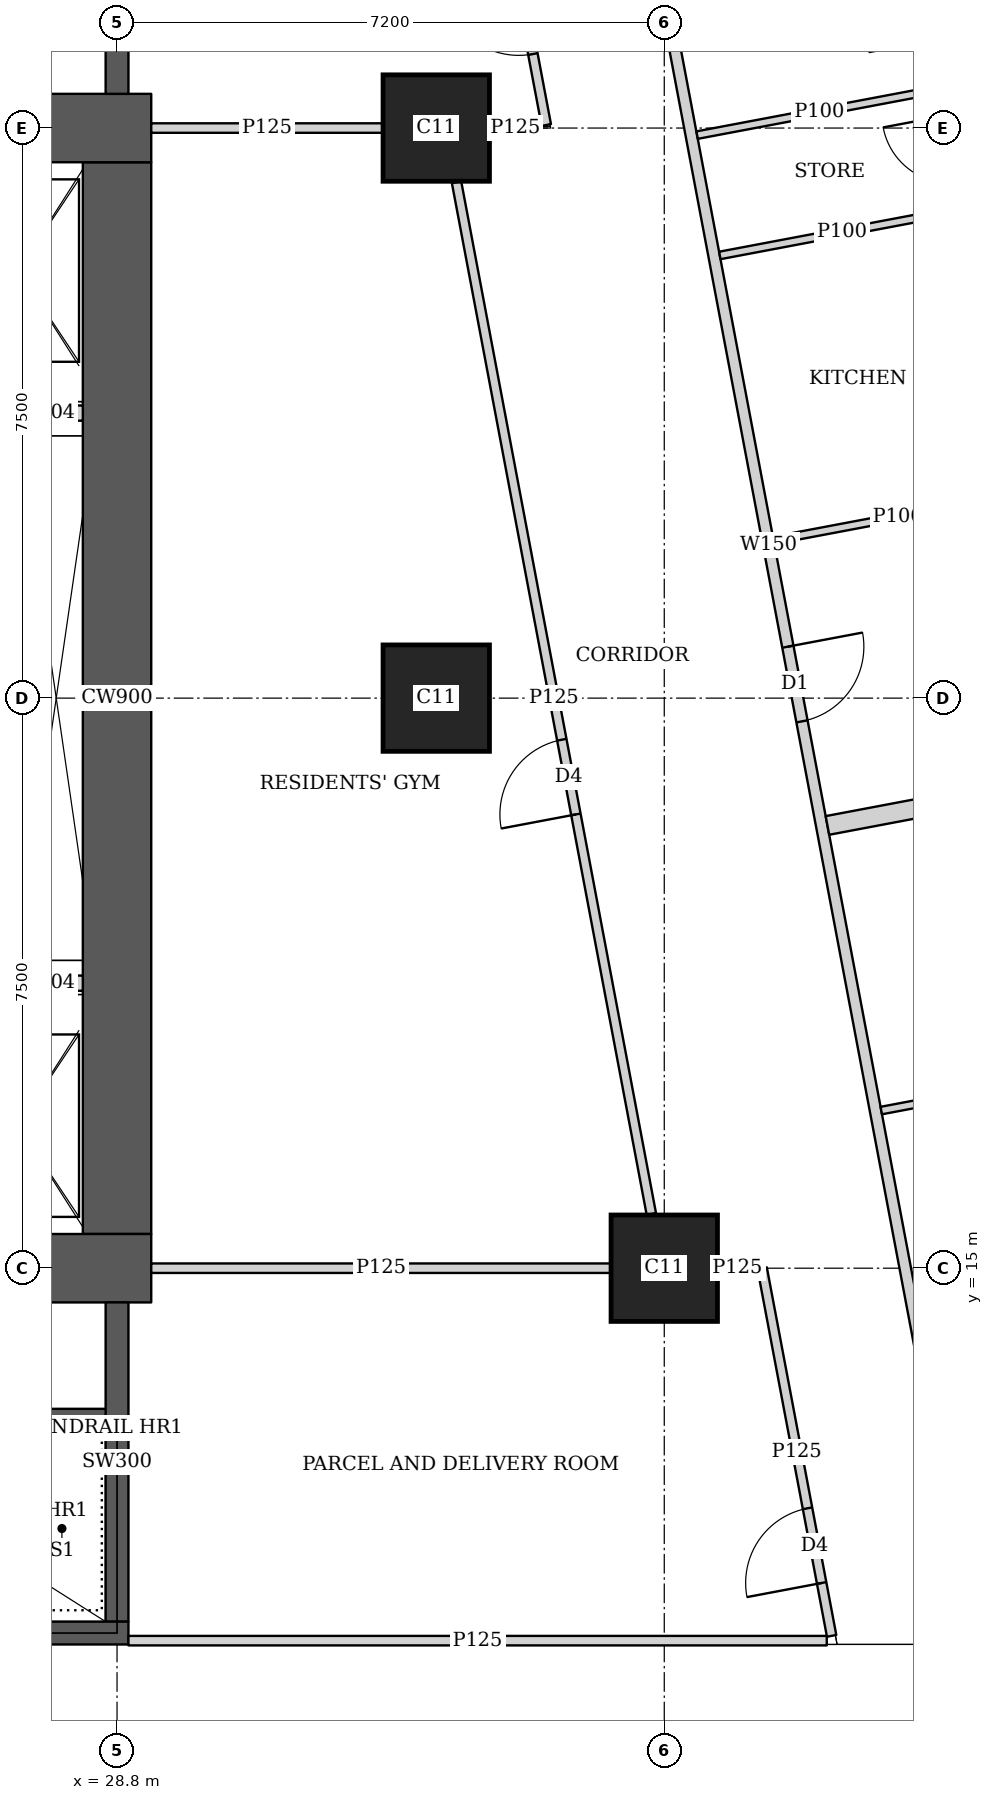
"""IFC4 building model, lengths in metres.
Left out: names, types, materials, properties, quantities, classifications, styles, units other than length and angle.
Written with IfcOpenShell. Run it as: python <this file> out.ifc"""

import sys

from ifc_helpers import new_model, si_unit, direction, frame, frame_2d, origin, origin_2d, place, context, subcontext, project, spatial, rectangle, extrude, element, fill, save


model = new_model("IFC4")
c1 = context("Model", 3, precision=1e-05, world=origin(), true_north=direction((0.0, 1.0)))
c2 = subcontext(c1, "Body", "Model", "MODEL_VIEW")
j1 = project(units=[si_unit("LENGTHUNIT", "METRE"), si_unit("PLANEANGLEUNIT", "RADIAN")], contexts=[c1])
p1 = place(None, origin())
s1 = spatial("IfcSite", under=j1, at=p1, CompositionType="ELEMENT")
p2 = place(p1, origin())
s2 = spatial("IfcBuilding", under=s1, at=p2, CompositionType="ELEMENT")
p3 = place(p2, frame((0.0, 0.0, 285.35)))
s3 = spatial("IfcBuildingStorey", under=s2, at=p3, CompositionType="ELEMENT", Elevation=285.35)
for number, where, z_axis, x_axis in (
    (1, (36.0, 15.0, 0.0), (0.0, 0.0, 1.0), (1.0, 0.0, 0.0)),
    (2, (33.0, 22.5, 0.0), (0.0, 0.0, 1.0), (1.0, 0.0, 0.0)),
    (3, (33.0, 30.0, 0.0), (0.0, 0.0, 1.0), (1.0, 0.0, 0.0)),
):
    element("IfcColumn", number, at=place(p3, frame(where, z_axis=z_axis, x_axis=x_axis)), inside=s3, PredefinedType="COLUMN", context=c2, shape_type="SweptSolid", body=[
        extrude(rectangle(XDim=1.4, YDim=1.4, at=origin_2d()), origin(), (0.0, 0.0, 1.0), 3.75),
    ])
p4 = place(p3, frame((13.95, 15.0, 0.0), z_axis=(0.0, 0.0, 1.0), x_axis=(1.0, 0.0, 0.0)))
e4 = element("IfcWall", 4, at=p4, inside=s3, PredefinedType="SHEAR", context=c2, shape_type="SweptSolid", body=[
    extrude(rectangle(XDim=15.3, YDim=0.9, at=frame_2d((7.65, 0.0))), origin(), (0.0, 0.0, 1.0), 3.75),
])
p5 = place(p4, frame((4.45, 0.0, 0.0)))
e5 = element("IfcOpeningElement", 5, at=p5, cuts=e4, PredefinedType="OPENING", context=c2, shape_type="SweptSolid", body=[
    extrude(rectangle(XDim=1.8, YDim=2.1, at=frame_2d((0.9, 1.05))), frame((0.0, 0.46, 0.0), z_axis=(0.0, -1.0, 0.0), x_axis=(1.0, 0.0, 0.0)), (0.0, 0.0, 1.0), 0.92),
])
p6 = place(p4, frame((10.7, 0.0, 0.0)))
e6 = element("IfcOpeningElement", 6, at=p6, cuts=e4, PredefinedType="OPENING", context=c2, shape_type="SweptSolid", body=[
    extrude(rectangle(XDim=1.1, YDim=2.1, at=frame_2d((0.55, 1.05))), frame((0.0, 0.46, 0.0), z_axis=(0.0, -1.0, 0.0), x_axis=(1.0, 0.0, 0.0)), (0.0, 0.0, 1.0), 0.92),
])
p7 = place(p3, frame((13.95, 30.0, 0.0), z_axis=(0.0, 0.0, 1.0), x_axis=(1.0, 0.0, 0.0)))
e7 = element("IfcWall", 7, at=p7, inside=s3, PredefinedType="SHEAR", context=c2, shape_type="SweptSolid", body=[
    extrude(rectangle(XDim=15.3, YDim=0.9, at=frame_2d((7.65, 0.0))), origin(), (0.0, 0.0, 1.0), 3.75),
])
p8 = place(p7, frame((4.45, 0.0, 0.0)))
e8 = element("IfcOpeningElement", 8, at=p8, cuts=e7, PredefinedType="OPENING", context=c2, shape_type="SweptSolid", body=[
    extrude(rectangle(XDim=1.8, YDim=2.1, at=frame_2d((0.9, 1.05))), frame((0.0, 0.46, 0.0), z_axis=(0.0, -1.0, 0.0), x_axis=(1.0, 0.0, 0.0)), (0.0, 0.0, 1.0), 0.92),
])
p9 = place(p7, frame((10.7, 0.0, 0.0)))
e9 = element("IfcOpeningElement", 9, at=p9, cuts=e7, PredefinedType="OPENING", context=c2, shape_type="SweptSolid", body=[
    extrude(rectangle(XDim=1.1, YDim=2.1, at=frame_2d((0.55, 1.05))), frame((0.0, 0.46, 0.0), z_axis=(0.0, -1.0, 0.0), x_axis=(1.0, 0.0, 0.0)), (0.0, 0.0, 1.0), 0.92),
])
p10 = place(p3, frame((28.8, 15.45, 0.0), z_axis=(0.0, 0.0, 1.0), x_axis=(0.0, 1.0, 0.0)))
e10 = element("IfcWall", 10, at=p10, inside=s3, PredefinedType="SHEAR", context=c2, shape_type="SweptSolid", body=[
    extrude(rectangle(XDim=14.1, YDim=0.9, at=frame_2d((7.05, 0.0))), origin(), (0.0, 0.0, 1.0), 3.75),
])
p11 = place(p3, frame((21.45, 10.2, 0.0), z_axis=(0.0, 0.0, 1.0), x_axis=(1.0, 0.0, 0.0)))
e11 = element("IfcWall", 11, at=p11, inside=s3, PredefinedType="SHEAR", context=c2, shape_type="SweptSolid", body=[
    extrude(rectangle(XDim=7.5, YDim=0.3, at=frame_2d((3.75, 0.0))), origin(), (0.0, 0.0, 1.0), 3.75),
])
p12 = place(p11, frame((1.2, 0.0, 0.0)))
e12 = element("IfcOpeningElement", 12, at=p12, cuts=e11, PredefinedType="OPENING", context=c2, shape_type="SweptSolid", body=[
    extrude(rectangle(XDim=1.1, YDim=2.1, at=frame_2d((0.55, 1.05))), frame((0.0, 0.16, 0.0), z_axis=(0.0, -1.0, 0.0), x_axis=(1.0, 0.0, 0.0)), (0.0, 0.0, 1.0), 0.32),
])
for number, where, z_axis, x_axis in (
    (13, (28.8, 10.35, 0.0), (0.0, 0.0, 1.0), (0.0, 1.0, 0.0)),
    (14, (28.8, 30.45, 0.0), (0.0, 0.0, 1.0), (0.0, 1.0, 0.0)),
):
    element("IfcWall", number, at=place(p3, frame(where, z_axis=z_axis, x_axis=x_axis)), inside=s3, PredefinedType="SHEAR", context=c2, shape_type="SweptSolid", body=[
        extrude(rectangle(XDim=4.2, YDim=0.3, at=frame_2d((2.1, 0.0))), origin(), (0.0, 0.0, 1.0), 3.75),
    ])
p13 = place(p3, frame((34.036, 42.186, 0.0), z_axis=(0.0, 0.0, 1.0), x_axis=(0.185593518645, -0.9826266055, 0.0)))
e15 = element("IfcWall", 15, at=p13, inside=s3, PredefinedType="SOLIDWALL", context=c2, shape_type="SweptSolid", body=[
    extrude(rectangle(XDim=35.961, YDim=0.15, at=frame_2d((17.98, 0.0))), origin(), (0.0, 0.0, 1.0), 2.5),
])
p14 = place(p13, frame((19.345, 0.0, 0.0)))
e16 = element("IfcOpeningElement", 16, at=p14, cuts=e15, PredefinedType="OPENING", context=c2, shape_type="SweptSolid", body=[
    extrude(rectangle(XDim=1.0, YDim=2.1, at=frame_2d((0.5, 1.05))), frame((0.0, 0.085, 0.0), z_axis=(0.0, -1.0, 0.0), x_axis=(1.0, 0.0, 0.0)), (0.0, 0.0, 1.0), 0.17),
])
p15 = place(p13, frame((33.774, 0.0, 0.0)))
e17 = element("IfcOpeningElement", 17, at=p15, cuts=e15, PredefinedType="OPENING", context=c2, shape_type="SweptSolid", body=[
    extrude(rectangle(XDim=1.0, YDim=2.1, at=frame_2d((0.5, 1.05))), frame((0.0, 0.085, 0.0), z_axis=(0.0, -1.0, 0.0), x_axis=(1.0, 0.0, 0.0)), (0.0, 0.0, 1.0), 0.17),
])
p16 = place(p3, frame((39.948, 28.932, 0.0), z_axis=(0.0, 0.0, 1.0), x_axis=(-0.982610347627, -0.185679575441, 0.0)))
e18 = element("IfcWall", 18, at=p16, inside=s3, PredefinedType="PARTITIONING", context=c2, shape_type="SweptSolid", body=[
    extrude(rectangle(XDim=3.274, YDim=0.1, at=frame_2d((1.637, 0.0))), origin(), (0.0, 0.0, 1.0), 3.5),
])
p17 = place(p3, frame((40.706, 25.192, 0.0), z_axis=(0.0, 0.0, 1.0), x_axis=(-0.982633623707, -0.185556356831, 0.0)))
e19 = element("IfcWall", 19, at=p17, inside=s3, PredefinedType="PARTITIONING", context=c2, shape_type="SweptSolid", body=[
    extrude(rectangle(XDim=3.325, YDim=0.1, at=frame_2d((1.663, 0.0))), origin(), (0.0, 0.0, 1.0), 3.5),
])
p18 = place(p3, frame((39.649, 30.515, 0.0), z_axis=(0.0, 0.0, 1.0), x_axis=(-0.982610347627, -0.185679575441, 0.0)))
e20 = element("IfcWall", 20, at=p18, inside=s3, PredefinedType="PARTITIONING", context=c2, shape_type="SweptSolid", body=[
    extrude(rectangle(XDim=3.274, YDim=0.1, at=frame_2d((1.637, 0.0))), origin(), (0.0, 0.0, 1.0), 2.5),
])
p19 = place(p3, frame((37.591, 41.685, 0.0), z_axis=(0.0, 0.0, 1.0), x_axis=(0.185541820726, -0.982636368532, 0.0)))
e21 = element("IfcWall", 21, at=p19, inside=s3, PredefinedType="PARTITIONING", context=c2, shape_type="SweptSolid", body=[
    extrude(rectangle(XDim=16.735, YDim=0.1, at=frame_2d((8.367, 0.0))), origin(), (0.0, 0.0, 1.0), 2.5),
])
p20 = place(p19, frame((2.413, 0.0, 0.0)))
e22 = element("IfcOpeningElement", 22, at=p20, cuts=e21, PredefinedType="OPENING", context=c2, shape_type="SweptSolid", body=[
    extrude(rectangle(XDim=0.9, YDim=2.1, at=frame_2d((0.45, 1.05))), frame((0.0, 0.06, 0.0), z_axis=(0.0, -1.0, 0.0), x_axis=(1.0, 0.0, 0.0)), (0.0, 0.0, 1.0), 0.12),
])
p21 = place(p19, frame((6.713, 0.0, 0.0)))
e23 = element("IfcOpeningElement", 23, at=p21, cuts=e21, PredefinedType="OPENING", context=c2, shape_type="SweptSolid", body=[
    extrude(rectangle(XDim=0.9, YDim=2.1, at=frame_2d((0.45, 1.05))), frame((0.0, 0.06, 0.0), z_axis=(0.0, -1.0, 0.0), x_axis=(1.0, 0.0, 0.0)), (0.0, 0.0, 1.0), 0.12),
])
p22 = place(p19, frame((9.805, 0.0, 0.0)))
e24 = element("IfcOpeningElement", 24, at=p22, cuts=e21, PredefinedType="OPENING", context=c2, shape_type="SweptSolid", body=[
    extrude(rectangle(XDim=0.9, YDim=2.1, at=frame_2d((0.45, 1.05))), frame((0.0, 0.06, 0.0), z_axis=(0.0, -1.0, 0.0), x_axis=(1.0, 0.0, 0.0)), (0.0, 0.0, 1.0), 0.12),
])
p23 = place(p19, frame((11.713, 0.0, 0.0)))
e25 = element("IfcOpeningElement", 25, at=p23, cuts=e21, PredefinedType="OPENING", context=c2, shape_type="SweptSolid", body=[
    extrude(rectangle(XDim=0.9, YDim=2.1, at=frame_2d((0.45, 1.05))), frame((0.0, 0.06, 0.0), z_axis=(0.0, -1.0, 0.0), x_axis=(1.0, 0.0, 0.0)), (0.0, 0.0, 1.0), 0.12),
])
p24 = place(p19, frame((14.426, 0.0, 0.0)))
e26 = element("IfcOpeningElement", 26, at=p24, cuts=e21, PredefinedType="OPENING", context=c2, shape_type="SweptSolid", body=[
    extrude(rectangle(XDim=0.9, YDim=2.1, at=frame_2d((0.45, 1.05))), frame((0.0, 0.06, 0.0), z_axis=(0.0, -1.0, 0.0), x_axis=(1.0, 0.0, 0.0)), (0.0, 0.0, 1.0), 0.12),
])
p25 = place(p3, frame((42.593, 21.665, 0.0), z_axis=(0.0, 0.0, 1.0), x_axis=(-0.982612837616, -0.185666398014, 0.0)))
e27 = element("IfcWall", 27, at=p25, inside=s3, PredefinedType="SOLIDWALL", context=c2, shape_type="SweptSolid", body=[
    extrude(rectangle(XDim=4.525, YDim=0.25, at=frame_2d((2.262, 0.0))), origin(), (0.0, 0.0, 1.0), 2.5),
])
p26 = place(p3, frame((42.073, 17.682, 0.0), z_axis=(0.0, 0.0, 1.0), x_axis=(-0.982620626894, -0.185625169636, 0.0)))
e28 = element("IfcWall", 28, at=p26, inside=s3, PredefinedType="PARTITIONING", context=c2, shape_type="SweptSolid", body=[
    extrude(rectangle(XDim=3.275, YDim=0.1, at=frame_2d((1.637, 0.0))), origin(), (0.0, 0.0, 1.0), 3.5),
])
p27 = place(p3, frame((28.95, 10.1, 0.0), z_axis=(0.0, 0.0, 1.0), x_axis=(1.0, 0.0, 0.0)))
e29 = element("IfcWall", 29, at=p27, inside=s3, PredefinedType="PARTITIONING", context=c2, shape_type="SweptSolid", body=[
    extrude(rectangle(XDim=9.188, YDim=0.125, at=frame_2d((4.594, 0.0))), origin(), (0.0, 0.0, 1.0), 3.5),
])
p28 = place(p3, frame((38.202, 10.163, 0.0), z_axis=(0.0, 0.0, 1.0), x_axis=(-0.185641892853, 0.982617467593, 0.0)))
e30 = element("IfcWall", 30, at=p28, inside=s3, PredefinedType="PARTITIONING", context=c2, shape_type="SweptSolid", body=[
    extrude(rectangle(XDim=4.922, YDim=0.125, at=frame_2d((2.461, 0.0))), origin(), (0.0, 0.0, 1.0), 3.5),
])
p29 = place(p28, frame((0.708, 0.0, 0.0)))
e31 = element("IfcOpeningElement", 31, at=p29, cuts=e30, PredefinedType="OPENING", context=c2, shape_type="SweptSolid", body=[
    extrude(rectangle(XDim=1.0, YDim=2.1, at=frame_2d((0.5, 1.05))), frame((0.0, 0.073, 0.0), z_axis=(0.0, -1.0, 0.0), x_axis=(1.0, 0.0, 0.0)), (0.0, 0.0, 1.0), 0.145),
])
p30 = place(p3, frame((34.448, 30.04, 0.0), z_axis=(0.0, 0.0, 1.0), x_axis=(-0.185749459238, 0.982597139418, 0.0)))
e32 = element("IfcWall", 32, at=p30, inside=s3, PredefinedType="PARTITIONING", context=c2, shape_type="SweptSolid", body=[
    extrude(rectangle(XDim=4.883, YDim=0.125, at=frame_2d((2.441, 0.0))), origin(), (0.0, 0.0, 1.0), 2.5),
])
p31 = place(p30, frame((0.95, 0.0, 0.0)))
e33 = element("IfcOpeningElement", 33, at=p31, cuts=e32, PredefinedType="OPENING", context=c2, shape_type="SweptSolid", body=[
    extrude(rectangle(XDim=1.0, YDim=2.1, at=frame_2d((0.5, 1.05))), frame((0.0, 0.073, 0.0), z_axis=(0.0, -1.0, 0.0), x_axis=(1.0, 0.0, 0.0)), (0.0, 0.0, 1.0), 0.145),
])
p32 = place(p30, frame((3.225, 0.0, 0.0)))
e34 = element("IfcOpeningElement", 34, at=p32, cuts=e32, PredefinedType="OPENING", context=c2, shape_type="SweptSolid", body=[
    extrude(rectangle(XDim=1.0, YDim=2.1, at=frame_2d((0.5, 1.05))), frame((0.0, 0.073, 0.0), z_axis=(0.0, -1.0, 0.0), x_axis=(1.0, 0.0, 0.0)), (0.0, 0.0, 1.0), 0.145),
])
p33 = place(p3, frame((35.83, 15.713, 0.0), z_axis=(0.0, 0.0, 1.0), x_axis=(-0.185534724166, 0.982637708481, 0.0)))
e35 = element("IfcWall", 35, at=p33, inside=s3, PredefinedType="PARTITIONING", context=c2, shape_type="SweptSolid", body=[
    extrude(rectangle(XDim=13.814, YDim=0.125, at=frame_2d((6.907, 0.0))), origin(), (0.0, 0.0, 1.0), 2.5),
])
p34 = place(p33, frame((5.35, 0.0, 0.0)))
e36 = element("IfcOpeningElement", 36, at=p34, cuts=e35, PredefinedType="OPENING", context=c2, shape_type="SweptSolid", body=[
    extrude(rectangle(XDim=1.0, YDim=2.1, at=frame_2d((0.5, 1.05))), frame((0.0, 0.073, 0.0), z_axis=(0.0, -1.0, 0.0), x_axis=(1.0, 0.0, 0.0)), (0.0, 0.0, 1.0), 0.145),
])
p35 = place(p3, frame((29.25, 15.0, 0.0), z_axis=(0.0, 0.0, 1.0), x_axis=(1.0, 0.0, 0.0)))
e37 = element("IfcWall", 37, at=p35, inside=s3, PredefinedType="PARTITIONING", context=c2, shape_type="SweptSolid", body=[
    extrude(rectangle(XDim=6.049, YDim=0.125, at=frame_2d((3.024, 0.0))), origin(), (0.0, 0.0, 1.0), 3.5),
])
p36 = place(p3, frame((36.701, 15.0, 0.0), z_axis=(0.0, 0.0, 1.0), x_axis=(1.0, 0.0, 0.0)))
e38 = element("IfcWall", 38, at=p36, inside=s3, PredefinedType="PARTITIONING", context=c2, shape_type="SweptSolid", body=[
    extrude(rectangle(XDim=0.526, YDim=0.125, at=frame_2d((0.263, 0.0))), origin(), (0.0, 0.0, 1.0), 3.5),
])
p37 = place(p3, frame((29.25, 30.0, 0.0), z_axis=(0.0, 0.0, 1.0), x_axis=(1.0, 0.0, 0.0)))
e39 = element("IfcWall", 39, at=p37, inside=s3, PredefinedType="PARTITIONING", context=c2, shape_type="SweptSolid", body=[
    extrude(rectangle(XDim=3.049, YDim=0.125, at=frame_2d((1.524, 0.0))), origin(), (0.0, 0.0, 1.0), 3.5),
])
p38 = place(p3, frame((33.701, 30.0, 0.0), z_axis=(0.0, 0.0, 1.0), x_axis=(1.0, 0.0, 0.0)))
e40 = element("IfcWall", 40, at=p38, inside=s3, PredefinedType="PARTITIONING", context=c2, shape_type="SweptSolid", body=[
    extrude(rectangle(XDim=0.679, YDim=0.125, at=frame_2d((0.339, 0.0))), origin(), (0.0, 0.0, 1.0), 2.5),
])
p39 = place(p3, frame((23.0, 13.05, 0.0), z_axis=(0.0, 0.0, 1.0), x_axis=(1.0, 0.0, 0.0)))
e41 = element("IfcWall", 41, at=p39, inside=s3, PredefinedType="SHEAR", context=c2, shape_type="SweptSolid", body=[
    extrude(rectangle(XDim=5.8, YDim=0.2, at=frame_2d((2.9, 0.0))), origin(), (0.0, 0.0, 1.0), 3.75),
])
for number, where, z_axis, x_axis in (
    (42, (27.4, 18.75, 0.0), (0.0, 0.0, 1.0), (1.0, 0.0, 0.0)),
    (43, (27.4, 26.25, 0.0), (0.0, 0.0, 1.0), (1.0, 0.0, 0.0)),
):
    element("IfcWall", number, at=place(p3, frame(where, z_axis=z_axis, x_axis=x_axis)), inside=s3, PredefinedType="SOLIDWALL", context=c2, shape_type="SweptSolid", body=[
        extrude(rectangle(XDim=0.95, YDim=0.2, at=frame_2d((0.475, 0.0))), origin(), (0.0, 0.0, 1.0), 3.5),
    ])
p40 = place(p14, origin())
e44 = element("IfcDoor", 44, at=p40, inside=s3, OperationType="SINGLE_SWING_LEFT", PredefinedType="DOOR", context=c2, shape_type="SweptSolid", body=[
    extrude(rectangle(XDim=1.0, YDim=2.1, at=frame_2d((0.5, 1.05))), frame((0.0, 0.025, 0.0), z_axis=(0.0, -1.0, 0.0), x_axis=(1.0, 0.0, 0.0)), (0.0, 0.0, 1.0), 0.05),
])
fill(e16, e44)
p41 = place(p29, origin())
e45 = element("IfcDoor", 45, at=p41, inside=s3, OperationType="SINGLE_SWING_LEFT", PredefinedType="DOOR", context=c2, shape_type="SweptSolid", body=[
    extrude(rectangle(XDim=1.0, YDim=2.1, at=frame_2d((0.5, 1.05))), frame((0.0, 0.025, 0.0), z_axis=(0.0, -1.0, 0.0), x_axis=(1.0, 0.0, 0.0)), (0.0, 0.0, 1.0), 0.05),
])
fill(e31, e45)
p42 = place(p34, origin())
e46 = element("IfcDoor", 46, at=p42, inside=s3, OperationType="SINGLE_SWING_LEFT", PredefinedType="DOOR", context=c2, shape_type="SweptSolid", body=[
    extrude(rectangle(XDim=1.0, YDim=2.1, at=frame_2d((0.5, 1.05))), frame((0.0, 0.025, 0.0), z_axis=(0.0, -1.0, 0.0), x_axis=(1.0, 0.0, 0.0)), (0.0, 0.0, 1.0), 0.05),
])
fill(e36, e46)
p43 = place(p31, origin())
e47 = element("IfcDoor", 47, at=p43, inside=s3, OperationType="SINGLE_SWING_RIGHT", PredefinedType="DOOR", context=c2, shape_type="SweptSolid", body=[
    extrude(rectangle(XDim=1.0, YDim=2.1, at=frame_2d((0.5, 1.05))), frame((0.0, 0.025, 0.0), z_axis=(0.0, -1.0, 0.0), x_axis=(1.0, 0.0, 0.0)), (0.0, 0.0, 1.0), 0.05),
])
fill(e33, e47)
save(model, sys.argv[1])
